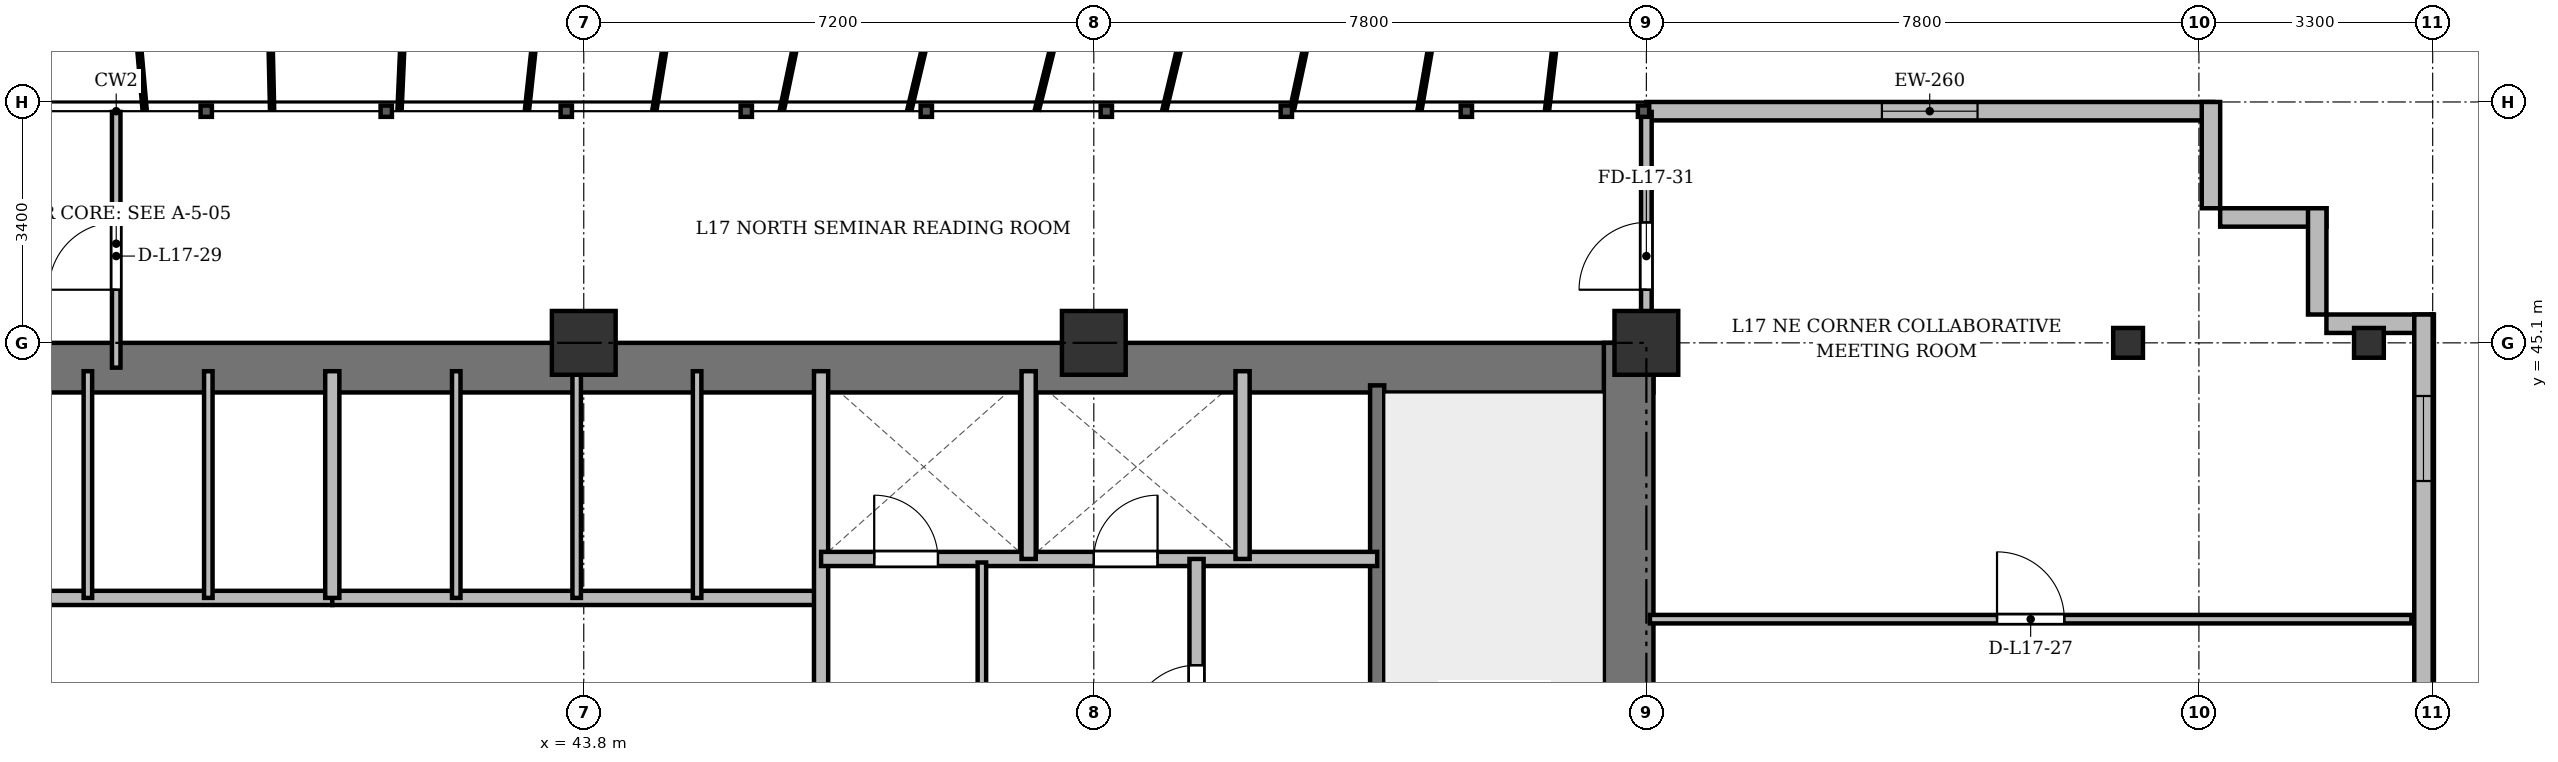
"""IFC4 building model, lengths in metres.
Left out: names, types, materials, properties, quantities, classifications, styles, units other than length and angle.
Written with IfcOpenShell. Run it as: python <this file> out.ifc"""

import sys

from ifc_helpers import new_model, si_unit, direction, frame, frame_2d, origin, origin_2d, place, context, subcontext, project, spatial, rectangle, i_section, extrude, source, transform, mapped, element, fill, save


model = new_model("IFC4")
c1 = context("Model", 3, precision=1e-05, world=origin(), true_north=direction((0.0, 1.0)))
c2 = subcontext(c1, "Body", "Model", "MODEL_VIEW")
j1 = project(units=[si_unit("LENGTHUNIT", "METRE"), si_unit("PLANEANGLEUNIT", "RADIAN")], contexts=[c1])
p1 = place(None, origin())
s1 = spatial("IfcSite", under=j1, at=p1, CompositionType="ELEMENT")
p2 = place(p1, origin())
s2 = spatial("IfcBuilding", under=s1, at=p2, CompositionType="ELEMENT")
p3 = place(p2, frame((0.0, 0.0, 66.7)))
s3 = spatial("IfcBuildingStorey", under=s2, at=p3, CompositionType="ELEMENT", Elevation=66.7)
m1 = source(origin(), c2, "Body", "SweptSolid", [
    extrude(rectangle(XDim=0.9, YDim=0.9, at=origin_2d()), origin(), (0.0, 0.0, 1.0), 3.6),
])
for number, where, z_axis, x_axis in (
    (1, (43.8, 45.1, 0.0), (0.0, 0.0, 1.0), (1.0, 0.0, 0.0)),
    (2, (51.0, 45.1, 0.0), (0.0, 0.0, 1.0), (1.0, 0.0, 0.0)),
    (3, (58.8, 45.1, 0.0), (0.0, 0.0, 1.0), (1.0, 0.0, 0.0)),
):
    element("IfcColumn", number, at=place(p3, frame(where, z_axis=z_axis, x_axis=x_axis)), inside=s3, PredefinedType="COLUMN", context=c2, shape_type="MappedRepresentation", body=[
        mapped(m1, transform((0.0, 0.0, 0.0), x_axis=(1.0, 0.0, 0.0), y_axis=(0.0, 1.0, 0.0), z_axis=(0.0, 0.0, 1.0), scale=1.0)),
    ])
m2 = source(origin(), c2, "Body", "SweptSolid", [
    extrude(i_section(OverallWidth=0.42, OverallDepth=0.42, WebThickness=0.026, FlangeThickness=0.04, at=origin_2d()), origin(), (0.0, 0.0, 1.0), 3.6),
])
for number, where, z_axis, x_axis in (
    (4, (65.6, 45.1, 0.0), (0.0, 0.0, 1.0), (1.0, 0.0, 0.0)),
    (5, (69.0, 45.1, 0.0), (0.0, 0.0, 1.0), (1.0, 0.0, 0.0)),
):
    element("IfcColumn", number, at=place(p3, frame(where, z_axis=z_axis, x_axis=x_axis)), inside=s3, PredefinedType="COLUMN", context=c2, shape_type="MappedRepresentation", body=[
        mapped(m2, transform((0.0, 0.0, 0.0), x_axis=(1.0, 0.0, 0.0), y_axis=(0.0, 1.0, 0.0), z_axis=(0.0, 0.0, 1.0), scale=1.0)),
    ])
p4 = place(p3, frame((58.8, 48.37, 0.0), z_axis=(0.0, 0.0, 1.0), x_axis=(1.0, 0.0, 0.0)))
e6 = element("IfcWall", 6, at=p4, inside=s3, PredefinedType="SOLIDWALL", context=c2, shape_type="SweptSolid", body=[
    extrude(rectangle(XDim=8.0, YDim=0.26, at=frame_2d((4.0, 0.0))), origin(), (0.0, 0.0, 1.0), 3.34),
])
p5 = place(p4, frame((3.325, 0.0, 0.9)))
e7 = element("IfcOpeningElement", 7, at=p5, cuts=e6, PredefinedType="OPENING", context=c2, shape_type="SweptSolid", body=[
    extrude(rectangle(XDim=1.35, YDim=1.5, at=frame_2d((0.675, 0.75))), frame((0.0, 0.14, 0.0), z_axis=(0.0, -1.0, 0.0), x_axis=(1.0, 0.0, 0.0)), (0.0, 0.0, 1.0), 0.28),
])
for number, where, z_axis, x_axis in (
    (8, (66.77, 48.5, 0.0), (0.0, 0.0, 1.0), (0.0, -1.0, 0.0)),
    (9, (66.9, 46.87, 0.0), (0.0, 0.0, 1.0), (1.0, 0.0, 0.0)),
    (10, (68.27, 47.0, 0.0), (0.0, 0.0, 1.0), (0.0, -1.0, 0.0)),
):
    element("IfcWall", number, at=place(p3, frame(where, z_axis=z_axis, x_axis=x_axis)), inside=s3, PredefinedType="SOLIDWALL", context=c2, shape_type="SweptSolid", body=[
        extrude(rectangle(XDim=1.5, YDim=0.26, at=frame_2d((0.75, 0.0))), origin(), (0.0, 0.0, 1.0), 3.34),
    ])
p6 = place(p3, frame((68.4, 45.37, 0.0), z_axis=(0.0, 0.0, 1.0), x_axis=(1.0, 0.0, 0.0)))
e11 = element("IfcWall", 11, at=p6, inside=s3, PredefinedType="SOLIDWALL", context=c2, shape_type="SweptSolid", body=[
    extrude(rectangle(XDim=1.5, YDim=0.26, at=frame_2d((0.75, 0.0))), origin(), (0.0, 0.0, 1.0), 2.69),
])
p7 = place(p3, frame((69.77, 45.5, 0.0), z_axis=(0.0, 0.0, 1.0), x_axis=(0.0, -1.0, 0.0)))
e12 = element("IfcWall", 12, at=p7, inside=s3, PredefinedType="SOLIDWALL", context=c2, shape_type="SweptSolid", body=[
    extrude(rectangle(XDim=39.6, YDim=0.26, at=frame_2d((19.8, 0.0))), origin(), (0.0, 0.0, 1.0), 3.34),
])
p8 = place(p7, frame((36.95, 0.0, 0.92)))
e13 = element("IfcOpeningElement", 13, at=p8, cuts=e12, PredefinedType="OPENING", context=c2, shape_type="SweptSolid", body=[
    extrude(rectangle(XDim=1.2, YDim=1.65, at=frame_2d((0.6, 0.825))), frame((0.0, 0.14, 0.0), z_axis=(0.0, -1.0, 0.0), x_axis=(1.0, 0.0, 0.0)), (0.0, 0.0, 1.0), 0.28),
])
p9 = place(p7, frame((32.9, 0.0, 0.92)))
e14 = element("IfcOpeningElement", 14, at=p9, cuts=e12, PredefinedType="OPENING", context=c2, shape_type="SweptSolid", body=[
    extrude(rectangle(XDim=2.4, YDim=2.1, at=frame_2d((1.2, 1.05))), frame((0.0, 0.14, 0.0), z_axis=(0.0, -1.0, 0.0), x_axis=(1.0, 0.0, 0.0)), (0.0, 0.0, 1.0), 0.28),
])
p10 = place(p7, frame((28.7, 0.0, 0.92)))
e15 = element("IfcOpeningElement", 15, at=p10, cuts=e12, PredefinedType="OPENING", context=c2, shape_type="SweptSolid", body=[
    extrude(rectangle(XDim=2.4, YDim=2.1, at=frame_2d((1.2, 1.05))), frame((0.0, 0.14, 0.0), z_axis=(0.0, -1.0, 0.0), x_axis=(1.0, 0.0, 0.0)), (0.0, 0.0, 1.0), 0.28),
])
p11 = place(p7, frame((7.5, 0.0, 0.92)))
e16 = element("IfcOpeningElement", 16, at=p11, cuts=e12, PredefinedType="OPENING", context=c2, shape_type="SweptSolid", body=[
    extrude(rectangle(XDim=2.4, YDim=2.1, at=frame_2d((1.2, 1.05))), frame((0.0, 0.14, 0.0), z_axis=(0.0, -1.0, 0.0), x_axis=(1.0, 0.0, 0.0)), (0.0, 0.0, 1.0), 0.28),
])
p12 = place(p7, frame((1.15, 0.0, 0.92)))
e17 = element("IfcOpeningElement", 17, at=p12, cuts=e12, PredefinedType="OPENING", context=c2, shape_type="SweptSolid", body=[
    extrude(rectangle(XDim=1.2, YDim=1.65, at=frame_2d((0.6, 0.825))), frame((0.0, 0.14, 0.0), z_axis=(0.0, -1.0, 0.0), x_axis=(1.0, 0.0, 0.0)), (0.0, 0.0, 1.0), 0.28),
])
p13 = place(p3, frame((15.5, 44.75, 0.0), z_axis=(0.0, 0.0, 1.0), x_axis=(1.0, 0.0, 0.0)))
e18 = element("IfcWall", 18, at=p13, inside=s3, PredefinedType="SHEAR", context=c2, shape_type="SweptSolid", body=[
    extrude(rectangle(XDim=43.4, YDim=0.7, at=frame_2d((21.7, 0.0))), origin(), (0.0, 0.0, 1.0), 3.34),
])
p14 = place(p3, frame((58.55, 33.4, 0.0), z_axis=(0.0, 0.0, 1.0), x_axis=(0.0, 1.0, 0.0)))
e19 = element("IfcWall", 19, at=p14, inside=s3, PredefinedType="SHEAR", context=c2, shape_type="SweptSolid", body=[
    extrude(rectangle(XDim=11.7, YDim=0.7, at=frame_2d((5.85, 0.0))), origin(), (0.0, 0.0, 1.0), 3.34),
])
p15 = place(p3, frame((55.0, 33.4, 0.0), z_axis=(0.0, 0.0, 1.0), x_axis=(0.0, 1.0, 0.0)))
e20 = element("IfcWall", 20, at=p15, inside=s3, PredefinedType="SHEAR", context=c2, shape_type="SweptSolid", body=[
    extrude(rectangle(XDim=11.1, YDim=0.2, at=frame_2d((5.55, 0.0))), origin(), (0.0, 0.0, 1.0), 3.34),
])
p16 = place(p15, frame((0.85, 0.0, 0.0)))
e21 = element("IfcOpeningElement", 21, at=p16, cuts=e20, PredefinedType="OPENING", context=c2, shape_type="SweptSolid", body=[
    extrude(rectangle(XDim=1.1, YDim=2.15, at=frame_2d((0.55, 1.075))), frame((0.0, 0.11, 0.0), z_axis=(0.0, -1.0, 0.0), x_axis=(1.0, 0.0, 0.0)), (0.0, 0.0, 1.0), 0.22),
])
p17 = place(p3, frame((33.35, 41.5, 0.0), z_axis=(0.0, 0.0, 1.0), x_axis=(1.0, 0.0, 0.0)))
e22 = element("IfcWall", 22, at=p17, inside=s3, PredefinedType="SOLIDWALL", context=c2, shape_type="SweptSolid", body=[
    extrude(rectangle(XDim=6.9, YDim=0.2, at=frame_2d((3.45, 0.0))), origin(), (0.0, 0.0, 1.0), 3.34),
])
for number, where, z_axis, x_axis in (
    (23, (36.8, 41.5, 0.0), (0.0, 0.0, 1.0), (0.0, 1.0, 0.0)),
    (24, (38.5, 41.5, 0.0), (0.0, 0.0, 1.0), (0.0, 1.0, 0.0)),
):
    element("IfcWall", number, at=place(p3, frame(where, z_axis=z_axis, x_axis=x_axis)), inside=s3, PredefinedType="PARTITIONING", context=c2, shape_type="SweptSolid", body=[
        extrude(rectangle(XDim=3.2, YDim=0.12, at=frame_2d((1.6, 0.0))), origin(), (0.0, 0.0, 1.0), 3.34),
    ])
p18 = place(p3, frame((40.25, 41.5, 0.0), z_axis=(0.0, 0.0, 1.0), x_axis=(1.0, 0.0, 0.0)))
e25 = element("IfcWall", 25, at=p18, inside=s3, PredefinedType="SOLIDWALL", context=c2, shape_type="SweptSolid", body=[
    extrude(rectangle(XDim=6.9, YDim=0.2, at=frame_2d((3.45, 0.0))), origin(), (0.0, 0.0, 1.0), 2.752),
])
p19 = place(p3, frame((40.25, 41.5, 0.0), z_axis=(0.0, 0.0, 1.0), x_axis=(0.0, 1.0, 0.0)))
e26 = element("IfcWall", 26, at=p19, inside=s3, PredefinedType="SOLIDWALL", context=c2, shape_type="SweptSolid", body=[
    extrude(rectangle(XDim=3.2, YDim=0.2, at=frame_2d((1.6, 0.0))), origin(), (0.0, 0.0, 1.0), 3.34),
])
p20 = place(p3, frame((42.0, 41.5, 0.0), z_axis=(0.0, 0.0, 1.0), x_axis=(0.0, 1.0, 0.0)))
e27 = element("IfcWall", 27, at=p20, inside=s3, PredefinedType="PARTITIONING", context=c2, shape_type="SweptSolid", body=[
    extrude(rectangle(XDim=3.2, YDim=0.12, at=frame_2d((1.6, 0.0))), origin(), (0.0, 0.0, 1.0), 3.34),
])
p21 = place(p3, frame((43.7, 41.5, 0.0), z_axis=(0.0, 0.0, 1.0), x_axis=(0.0, 1.0, 0.0)))
e28 = element("IfcWall", 28, at=p21, inside=s3, PredefinedType="PARTITIONING", context=c2, shape_type="SweptSolid", body=[
    extrude(rectangle(XDim=3.2, YDim=0.12, at=frame_2d((1.6, 0.0))), origin(), (0.0, 0.0, 1.0), 2.752),
])
p22 = place(p3, frame((45.4, 41.5, 0.0), z_axis=(0.0, 0.0, 1.0), x_axis=(0.0, 1.0, 0.0)))
e29 = element("IfcWall", 29, at=p22, inside=s3, PredefinedType="PARTITIONING", context=c2, shape_type="SweptSolid", body=[
    extrude(rectangle(XDim=3.2, YDim=0.12, at=frame_2d((1.6, 0.0))), origin(), (0.0, 0.0, 1.0), 3.34),
])
p23 = place(p3, frame((47.15, 33.4, 0.0), z_axis=(0.0, 0.0, 1.0), x_axis=(0.0, 1.0, 0.0)))
e30 = element("IfcWall", 30, at=p23, inside=s3, PredefinedType="SOLIDWALL", context=c2, shape_type="SweptSolid", body=[
    extrude(rectangle(XDim=11.3, YDim=0.2, at=frame_2d((5.65, 0.0))), origin(), (0.0, 0.0, 1.0), 2.69),
])
p24 = place(p3, frame((47.15, 42.05, 0.0), z_axis=(0.0, 0.0, 1.0), x_axis=(1.0, 0.0, 0.0)))
e31 = element("IfcWall", 31, at=p24, inside=s3, PredefinedType="SOLIDWALL", context=c2, shape_type="SweptSolid", body=[
    extrude(rectangle(XDim=7.85, YDim=0.2, at=frame_2d((3.925, 0.0))), origin(), (0.0, 0.0, 1.0), 2.752),
])
p25 = place(p24, frame((0.75, 0.0, 0.0)))
e32 = element("IfcOpeningElement", 32, at=p25, cuts=e31, PredefinedType="OPENING", context=c2, shape_type="SweptSolid", body=[
    extrude(rectangle(XDim=0.9, YDim=2.1, at=frame_2d((0.45, 1.05))), frame((0.0, 0.11, 0.0), z_axis=(0.0, -1.0, 0.0), x_axis=(1.0, 0.0, 0.0)), (0.0, 0.0, 1.0), 0.22),
])
p26 = place(p24, frame((3.85, 0.0, 0.0)))
e33 = element("IfcOpeningElement", 33, at=p26, cuts=e31, PredefinedType="OPENING", context=c2, shape_type="SweptSolid", body=[
    extrude(rectangle(XDim=0.9, YDim=2.1, at=frame_2d((0.45, 1.05))), frame((0.0, 0.11, 0.0), z_axis=(0.0, -1.0, 0.0), x_axis=(1.0, 0.0, 0.0)), (0.0, 0.0, 1.0), 0.22),
])
for number, where, z_axis, x_axis in (
    (34, (50.08, 42.05, 0.0), (0.0, 0.0, 1.0), (0.0, 1.0, 0.0)),
    (35, (53.1, 42.05, 0.0), (0.0, 0.0, 1.0), (0.0, 1.0, 0.0)),
):
    element("IfcWall", number, at=place(p3, frame(where, z_axis=z_axis, x_axis=x_axis)), inside=s3, PredefinedType="SOLIDWALL", context=c2, shape_type="SweptSolid", body=[
        extrude(rectangle(XDim=2.65, YDim=0.2, at=frame_2d((1.325, 0.0))), origin(), (0.0, 0.0, 1.0), 3.34),
    ])
p27 = place(p3, frame((52.45, 33.4, 0.0), z_axis=(0.0, 0.0, 1.0), x_axis=(0.0, 1.0, 0.0)))
e36 = element("IfcWall", 36, at=p27, inside=s3, PredefinedType="PARTITIONING", context=c2, shape_type="SweptSolid", body=[
    extrude(rectangle(XDim=8.65, YDim=0.2, at=frame_2d((4.325, 0.0))), origin(), (0.0, 0.0, 1.0), 2.69),
])
p28 = place(p27, frame((6.2, 0.0, 0.0)))
e37 = element("IfcOpeningElement", 37, at=p28, cuts=e36, PredefinedType="OPENING", context=c2, shape_type="SweptSolid", body=[
    extrude(rectangle(XDim=0.95, YDim=2.15, at=frame_2d((0.475, 1.075))), frame((0.0, 0.11, 0.0), z_axis=(0.0, -1.0, 0.0), x_axis=(1.0, 0.0, 0.0)), (0.0, 0.0, 1.0), 0.22),
])
p29 = place(p3, frame((49.42, 33.4, 0.0), z_axis=(0.0, 0.0, 1.0), x_axis=(0.0, 1.0, 0.0)))
e38 = element("IfcWall", 38, at=p29, inside=s3, PredefinedType="PARTITIONING", context=c2, shape_type="SweptSolid", body=[
    extrude(rectangle(XDim=8.6, YDim=0.12, at=frame_2d((4.3, 0.0))), origin(), (0.0, 0.0, 1.0), 2.69),
])
p30 = place(p29, frame((1.3, 0.0, 0.0)))
e39 = element("IfcOpeningElement", 39, at=p30, cuts=e38, PredefinedType="OPENING", context=c2, shape_type="SweptSolid", body=[
    extrude(rectangle(XDim=0.95, YDim=2.15, at=frame_2d((0.475, 1.075))), frame((0.0, 0.07, 0.0), z_axis=(0.0, -1.0, 0.0), x_axis=(1.0, 0.0, 0.0)), (0.0, 0.0, 1.0), 0.14),
])
p31 = place(p29, frame((5.5, 0.0, 0.0)))
e40 = element("IfcOpeningElement", 40, at=p31, cuts=e38, PredefinedType="OPENING", context=c2, shape_type="SweptSolid", body=[
    extrude(rectangle(XDim=0.95, YDim=2.15, at=frame_2d((0.475, 1.075))), frame((0.0, 0.07, 0.0), z_axis=(0.0, -1.0, 0.0), x_axis=(1.0, 0.0, 0.0)), (0.0, 0.0, 1.0), 0.14),
])
p32 = place(p3, frame((58.85, 41.2, 0.0), z_axis=(0.0, 0.0, 1.0), x_axis=(1.0, 0.0, 0.0)))
e41 = element("IfcWall", 41, at=p32, inside=s3, PredefinedType="PARTITIONING", context=c2, shape_type="SweptSolid", body=[
    extrude(rectangle(XDim=10.75, YDim=0.12, at=frame_2d((5.375, 0.0))), origin(), (0.0, 0.0, 1.0), 2.752),
])
p33 = place(p32, frame((4.9, 0.0, 0.0)))
e42 = element("IfcOpeningElement", 42, at=p33, cuts=e41, PredefinedType="OPENING", context=c2, shape_type="SweptSolid", body=[
    extrude(rectangle(XDim=0.95, YDim=2.15, at=frame_2d((0.475, 1.075))), frame((0.0, 0.07, 0.0), z_axis=(0.0, -1.0, 0.0), x_axis=(1.0, 0.0, 0.0)), (0.0, 0.0, 1.0), 0.14),
])
p34 = place(p3, frame((37.2, 44.75, 0.0), z_axis=(0.0, 0.0, 1.0), x_axis=(0.0, 1.0, 0.0)))
e43 = element("IfcWall", 43, at=p34, inside=s3, PredefinedType="PARTITIONING", context=c2, shape_type="SweptSolid", body=[
    extrude(rectangle(XDim=3.61, YDim=0.12, at=frame_2d((1.805, 0.0))), origin(), (0.0, 0.0, 1.0), 2.69),
])
p35 = place(p34, frame((1.1, 0.0, 0.0)))
e44 = element("IfcOpeningElement", 44, at=p35, cuts=e43, PredefinedType="OPENING", context=c2, shape_type="SweptSolid", body=[
    extrude(rectangle(XDim=0.95, YDim=2.15, at=frame_2d((0.475, 1.075))), frame((0.0, 0.07, 0.0), z_axis=(0.0, -1.0, 0.0), x_axis=(1.0, 0.0, 0.0)), (0.0, 0.0, 1.0), 0.14),
])
p36 = place(p3, frame((58.8, 44.75, 0.0), z_axis=(0.0, 0.0, 1.0), x_axis=(0.0, 1.0, 0.0)))
e45 = element("IfcWall", 45, at=p36, inside=s3, PredefinedType="PARTITIONING", context=c2, shape_type="SweptSolid", body=[
    extrude(rectangle(XDim=3.61, YDim=0.15, at=frame_2d((1.805, 0.0))), origin(), (0.0, 0.0, 1.0), 2.752),
])
p37 = place(p36, frame((1.1, 0.0, 0.0)))
e46 = element("IfcOpeningElement", 46, at=p37, cuts=e45, PredefinedType="OPENING", context=c2, shape_type="SweptSolid", body=[
    extrude(rectangle(XDim=0.95, YDim=2.15, at=frame_2d((0.475, 1.075))), frame((0.0, 0.085, 0.0), z_axis=(0.0, -1.0, 0.0), x_axis=(1.0, 0.0, 0.0)), (0.0, 0.0, 1.0), 0.17),
])
m3 = source(origin(), c2, "Body", "SweptSolid", [
    extrude(rectangle(XDim=1.35, YDim=1.5, at=frame_2d((0.675, 0.75))), frame((0.0, 0.03, 0.0), z_axis=(0.0, -1.0, 0.0), x_axis=(1.0, 0.0, 0.0)), (0.0, 0.0, 1.0), 0.06),
])
p38 = place(p5, origin())
e47 = element("IfcWindow", 47, at=p38, inside=s3, PartitioningType="SINGLE_PANEL", PredefinedType="WINDOW", context=c2, shape_type="MappedRepresentation", body=[
    mapped(m3, transform((0.0, 0.0, 0.0), x_axis=(1.0, 0.0, 0.0), y_axis=(0.0, 1.0, 0.0), z_axis=(0.0, 0.0, 1.0), scale=1.0)),
])
fill(e7, e47)
m4 = source(origin(), c2, "Body", "SweptSolid", [
    extrude(rectangle(XDim=1.2, YDim=1.65, at=frame_2d((0.6, 0.825))), frame((0.0, 0.03, 0.0), z_axis=(0.0, -1.0, 0.0), x_axis=(1.0, 0.0, 0.0)), (0.0, 0.0, 1.0), 0.06),
])
p39 = place(p12, origin())
e48 = element("IfcWindow", 48, at=p39, inside=s3, PartitioningType="SINGLE_PANEL", PredefinedType="WINDOW", context=c2, shape_type="MappedRepresentation", body=[
    mapped(m4, transform((0.0, 0.0, 0.0), x_axis=(1.0, 0.0, 0.0), y_axis=(0.0, 1.0, 0.0), z_axis=(0.0, 0.0, 1.0), scale=1.0)),
])
fill(e17, e48)
m5 = source(origin(), c2, "Body", "SweptSolid", [
    extrude(rectangle(XDim=0.9, YDim=2.1, at=frame_2d((0.45, 1.05))), frame((0.0, 0.025, 0.0), z_axis=(0.0, -1.0, 0.0), x_axis=(1.0, 0.0, 0.0)), (0.0, 0.0, 1.0), 0.05),
])
p40 = place(p25, origin())
e49 = element("IfcDoor", 49, at=p40, inside=s3, OperationType="SINGLE_SWING_LEFT", PredefinedType="DOOR", context=c2, shape_type="MappedRepresentation", body=[
    mapped(m5, transform((0.0, 0.0, 0.0), x_axis=(1.0, 0.0, 0.0), y_axis=(0.0, 1.0, 0.0), z_axis=(0.0, 0.0, 1.0), scale=1.0)),
])
fill(e32, e49)
p41 = place(p26, origin())
e50 = element("IfcDoor", 50, at=p41, inside=s3, OperationType="SINGLE_SWING_RIGHT", PredefinedType="DOOR", context=c2, shape_type="MappedRepresentation", body=[
    mapped(m5, transform((0.0, 0.0, 0.0), x_axis=(1.0, 0.0, 0.0), y_axis=(0.0, 1.0, 0.0), z_axis=(0.0, 0.0, 1.0), scale=1.0)),
])
fill(e33, e50)
m6 = source(origin(), c2, "Body", "SweptSolid", [
    extrude(rectangle(XDim=0.95, YDim=2.15, at=frame_2d((0.475, 1.075))), frame((0.0, 0.025, 0.0), z_axis=(0.0, -1.0, 0.0), x_axis=(1.0, 0.0, 0.0)), (0.0, 0.0, 1.0), 0.05),
])
p42 = place(p28, origin())
e51 = element("IfcDoor", 51, at=p42, inside=s3, OperationType="SINGLE_SWING_LEFT", PredefinedType="DOOR", context=c2, shape_type="MappedRepresentation", body=[
    mapped(m6, transform((0.0, 0.0, 0.0), x_axis=(1.0, 0.0, 0.0), y_axis=(0.0, 1.0, 0.0), z_axis=(0.0, 0.0, 1.0), scale=1.0)),
])
fill(e37, e51)
p43 = place(p33, origin())
e52 = element("IfcDoor", 52, at=p43, inside=s3, OperationType="SINGLE_SWING_LEFT", PredefinedType="DOOR", context=c2, shape_type="MappedRepresentation", body=[
    mapped(m6, transform((0.0, 0.0, 0.0), x_axis=(1.0, 0.0, 0.0), y_axis=(0.0, 1.0, 0.0), z_axis=(0.0, 0.0, 1.0), scale=1.0)),
])
fill(e42, e52)
p44 = place(p35, origin())
e53 = element("IfcDoor", 53, at=p44, inside=s3, OperationType="SINGLE_SWING_LEFT", PredefinedType="DOOR", context=c2, shape_type="MappedRepresentation", body=[
    mapped(m6, transform((0.0, 0.0, 0.0), x_axis=(1.0, 0.0, 0.0), y_axis=(0.0, 1.0, 0.0), z_axis=(0.0, 0.0, 1.0), scale=1.0)),
])
fill(e44, e53)
p45 = place(p37, origin())
e54 = element("IfcDoor", 54, at=p45, inside=s3, OperationType="SINGLE_SWING_LEFT", PredefinedType="DOOR", context=c2, shape_type="MappedRepresentation", body=[
    mapped(m6, transform((0.0, 0.0, 0.0), x_axis=(1.0, 0.0, 0.0), y_axis=(0.0, 1.0, 0.0), z_axis=(0.0, 0.0, 1.0), scale=1.0)),
])
fill(e46, e54)
save(model, sys.argv[1])
